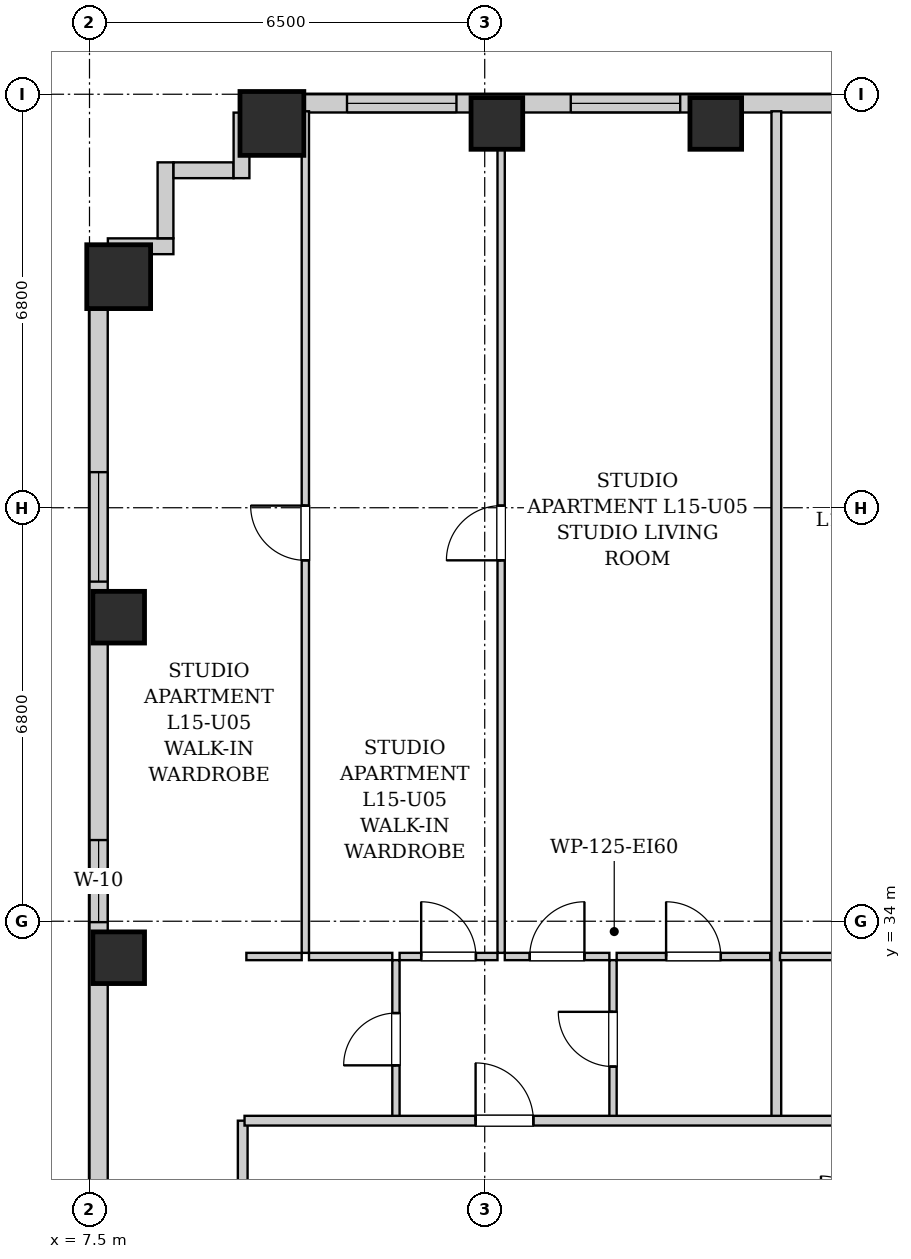
"""IFC4 building model, lengths in metres.
Left out: names, types, materials, properties, quantities, classifications, styles, units other than length and angle.
Written with IfcOpenShell. Run it as: python <this file> out.ifc"""

import sys

from ifc_helpers import new_model, si_unit, direction, frame, frame_2d, origin, origin_2d, place, context, subcontext, project, spatial, rectangle, extrude, element, fill, save


model = new_model("IFC4")
c1 = context("Model", 3, precision=1e-05, world=origin(), true_north=direction((0.0, 1.0)))
c2 = subcontext(c1, "Body", "Model", "MODEL_VIEW")
j1 = project(units=[si_unit("LENGTHUNIT", "METRE"), si_unit("PLANEANGLEUNIT", "RADIAN")], contexts=[c1])
p1 = place(None, origin())
s1 = spatial("IfcSite", under=j1, at=p1, CompositionType="ELEMENT")
p2 = place(p1, origin())
s2 = spatial("IfcBuilding", under=s1, at=p2, CompositionType="ELEMENT")
p3 = place(p2, frame((0.0, 0.0, 57.8)))
s3 = spatial("IfcBuildingStorey", under=s2, at=p3, CompositionType="ELEMENT", Elevation=57.8)
p4 = place(p3, frame((10.5, 47.12, 0.0), z_axis=(0.0, 0.0, 1.0), x_axis=(1.0, 0.0, 0.0)))
e1 = element("IfcColumn", 1, at=p4, inside=s3, PredefinedType="COLUMN", context=c2, shape_type="SweptSolid", body=[
    extrude(rectangle(XDim=1.05, YDim=1.05, at=origin_2d()), origin(), (0.0, 0.0, 1.0), 3.2),
])
for number, where, z_axis, x_axis in (
    (2, (14.2, 47.12, 0.0), (0.0, 0.0, 1.0), (1.0, 0.0, 0.0)),
    (3, (17.8, 47.12, 0.0), (0.0, 0.0, 1.0), (1.0, 0.0, 0.0)),
    (4, (7.98, 33.4, 0.0), (0.0, 0.0, 1.0), (1.0, 0.0, 0.0)),
    (5, (7.98, 39.0, 0.0), (0.0, 0.0, 1.0), (1.0, 0.0, 0.0)),
):
    element("IfcColumn", number, at=place(p3, frame(where, z_axis=z_axis, x_axis=x_axis)), inside=s3, PredefinedType="COLUMN", context=c2, shape_type="SweptSolid", body=[
        extrude(rectangle(XDim=0.85, YDim=0.85, at=origin_2d()), origin(), (0.0, 0.0, 1.0), 3.2),
    ])
p5 = place(p3, frame((7.98, 44.6, 0.0), z_axis=(0.0, 0.0, 1.0), x_axis=(1.0, 0.0, 0.0)))
e6 = element("IfcColumn", 6, at=p5, inside=s3, PredefinedType="COLUMN", context=c2, shape_type="SweptSolid", body=[
    extrude(rectangle(XDim=1.05, YDim=1.05, at=origin_2d()), origin(), (0.0, 0.0, 1.0), 3.2),
])
p6 = place(p3, frame((10.0, 47.45, 0.0), z_axis=(0.0, 0.0, 1.0), x_axis=(1.0, 0.0, 0.0)))
e7 = element("IfcWall", 7, at=p6, inside=s3, PredefinedType="SOLIDWALL", context=c2, shape_type="SweptSolid", body=[
    extrude(rectangle(XDim=27.55, YDim=0.3, at=frame_2d((13.775, 0.0))), origin(), (0.0, 0.0, 1.0), 1.975),
])
p7 = place(p6, frame((1.735, 0.0, 0.55)))
e8 = element("IfcOpeningElement", 8, at=p7, cuts=e7, PredefinedType="OPENING", context=c2, shape_type="SweptSolid", body=[
    extrude(rectangle(XDim=1.8, YDim=1.2, at=frame_2d((0.9, 0.6))), frame((0.0, 0.16, 0.0), z_axis=(0.0, -1.0, 0.0), x_axis=(1.0, 0.0, 0.0)), (0.0, 0.0, 1.0), 0.32),
])
p8 = place(p6, frame((5.415, 0.0, 0.55)))
e9 = element("IfcOpeningElement", 9, at=p8, cuts=e7, PredefinedType="OPENING", context=c2, shape_type="SweptSolid", body=[
    extrude(rectangle(XDim=1.8, YDim=1.2, at=frame_2d((0.9, 0.6))), frame((0.0, 0.16, 0.0), z_axis=(0.0, -1.0, 0.0), x_axis=(1.0, 0.0, 0.0)), (0.0, 0.0, 1.0), 0.32),
])
p9 = place(p6, frame((10.617, 0.0, 0.55)))
e10 = element("IfcOpeningElement", 10, at=p9, cuts=e7, PredefinedType="OPENING", context=c2, shape_type="SweptSolid", body=[
    extrude(rectangle(XDim=1.8, YDim=1.2, at=frame_2d((0.9, 0.6))), frame((0.0, 0.16, 0.0), z_axis=(0.0, -1.0, 0.0), x_axis=(1.0, 0.0, 0.0)), (0.0, 0.0, 1.0), 0.32),
])
p10 = place(p6, frame((17.5, 0.0, 0.55)))
e11 = element("IfcOpeningElement", 11, at=p10, cuts=e7, PredefinedType="OPENING", context=c2, shape_type="SweptSolid", body=[
    extrude(rectangle(XDim=0.85, YDim=1.2, at=frame_2d((0.425, 0.6))), frame((0.0, 0.16, 0.0), z_axis=(0.0, -1.0, 0.0), x_axis=(1.0, 0.0, 0.0)), (0.0, 0.0, 1.0), 0.32),
])
p11 = place(p6, frame((19.349, 0.0, 0.55)))
e12 = element("IfcOpeningElement", 12, at=p11, cuts=e7, PredefinedType="OPENING", context=c2, shape_type="SweptSolid", body=[
    extrude(rectangle(XDim=1.8, YDim=1.2, at=frame_2d((0.9, 0.6))), frame((0.0, 0.16, 0.0), z_axis=(0.0, -1.0, 0.0), x_axis=(1.0, 0.0, 0.0)), (0.0, 0.0, 1.0), 0.32),
])
p12 = place(p6, frame((24.769, 0.0, 0.55)))
e13 = element("IfcOpeningElement", 13, at=p12, cuts=e7, PredefinedType="OPENING", context=c2, shape_type="SweptSolid", body=[
    extrude(rectangle(XDim=1.8, YDim=1.2, at=frame_2d((0.9, 0.6))), frame((0.0, 0.16, 0.0), z_axis=(0.0, -1.0, 0.0), x_axis=(1.0, 0.0, 0.0)), (0.0, 0.0, 1.0), 0.32),
])
p13 = place(p3, frame((7.65, 19.4, 0.0), z_axis=(0.0, 0.0, 1.0), x_axis=(0.0, 1.0, 0.0)))
e14 = element("IfcWall", 14, at=p13, inside=s3, PredefinedType="SOLIDWALL", context=c2, shape_type="SweptSolid", body=[
    extrude(rectangle(XDim=25.7, YDim=0.3, at=frame_2d((12.85, 0.0))), origin(), (0.0, 0.0, 1.0), 1.975),
])
p14 = place(p13, frame((20.185, 0.0, 0.55)))
e15 = element("IfcOpeningElement", 15, at=p14, cuts=e14, PredefinedType="OPENING", context=c2, shape_type="SweptSolid", body=[
    extrude(rectangle(XDim=1.8, YDim=1.2, at=frame_2d((0.9, 0.6))), frame((0.0, 0.16, 0.0), z_axis=(0.0, -1.0, 0.0), x_axis=(1.0, 0.0, 0.0)), (0.0, 0.0, 1.0), 0.32),
])
p15 = place(p13, frame((14.585, 0.0, 0.55)))
e16 = element("IfcOpeningElement", 16, at=p15, cuts=e14, PredefinedType="OPENING", context=c2, shape_type="SweptSolid", body=[
    extrude(rectangle(XDim=1.35, YDim=1.2, at=frame_2d((0.675, 0.6))), frame((0.0, 0.16, 0.0), z_axis=(0.0, -1.0, 0.0), x_axis=(1.0, 0.0, 0.0)), (0.0, 0.0, 1.0), 0.32),
])
p16 = place(p13, frame((5.1, 0.0, 0.55)))
e17 = element("IfcOpeningElement", 17, at=p16, cuts=e14, PredefinedType="OPENING", context=c2, shape_type="SweptSolid", body=[
    extrude(rectangle(XDim=1.8, YDim=1.2, at=frame_2d((0.9, 0.6))), frame((0.0, 0.16, 0.0), z_axis=(0.0, -1.0, 0.0), x_axis=(1.0, 0.0, 0.0)), (0.0, 0.0, 1.0), 0.32),
])
p17 = place(p13, frame((7.16, 0.0, 0.55)))
e18 = element("IfcOpeningElement", 18, at=p17, cuts=e14, PredefinedType="OPENING", context=c2, shape_type="SweptSolid", body=[
    extrude(rectangle(XDim=1.35, YDim=1.2, at=frame_2d((0.675, 0.6))), frame((0.0, 0.16, 0.0), z_axis=(0.0, -1.0, 0.0), x_axis=(1.0, 0.0, 0.0)), (0.0, 0.0, 1.0), 0.32),
])
p18 = place(p3, frame((7.802, 45.1, 0.0), z_axis=(0.0, 0.0, 1.0), x_axis=(1.0, 0.0, 0.0)))
e19 = element("IfcWall", 19, at=p18, inside=s3, PredefinedType="SOLIDWALL", context=c2, shape_type="SweptSolid", body=[
    extrude(rectangle(XDim=1.078, YDim=0.26, at=frame_2d((0.539, 0.0))), origin(), (0.0, 0.0, 1.0), 2.94),
])
p19 = place(p3, frame((8.75, 45.232, 0.0), z_axis=(0.0, 0.0, 1.0), x_axis=(0.0, 1.0, 0.0)))
e20 = element("IfcWall", 20, at=p19, inside=s3, PredefinedType="SOLIDWALL", context=c2, shape_type="SweptSolid", body=[
    extrude(rectangle(XDim=1.248, YDim=0.26, at=frame_2d((0.624, 0.0))), origin(), (0.0, 0.0, 1.0), 2.94),
])
p20 = place(p3, frame((8.882, 46.35, 0.0), z_axis=(0.0, 0.0, 1.0), x_axis=(1.0, 0.0, 0.0)))
e21 = element("IfcWall", 21, at=p20, inside=s3, PredefinedType="SOLIDWALL", context=c2, shape_type="SweptSolid", body=[
    extrude(rectangle(XDim=0.986, YDim=0.26, at=frame_2d((0.493, 0.0))), origin(), (0.0, 0.0, 1.0), 2.94),
])
p21 = place(p3, frame((10.0, 46.22, 0.0), z_axis=(0.0, 0.0, 1.0), x_axis=(0.0, 1.0, 0.0)))
e22 = element("IfcWall", 22, at=p21, inside=s3, PredefinedType="SOLIDWALL", context=c2, shape_type="SweptSolid", body=[
    extrude(rectangle(XDim=1.078, YDim=0.26, at=frame_2d((0.539, 0.0))), origin(), (0.0, 0.0, 1.0), 2.94),
])
p22 = place(p3, frame((10.02, 28.98, 0.0), z_axis=(0.0, 0.0, 1.0), x_axis=(0.0, 1.0, 0.0)))
e23 = element("IfcWall", 23, at=p22, inside=s3, PredefinedType="PARTITIONING", context=c2, shape_type="SweptSolid", body=[
    extrude(rectangle(XDim=1.74, YDim=0.16, at=frame_2d((0.87, 0.0))), origin(), (0.0, 0.0, 1.0), 2.94),
])
p23 = place(p3, frame((12.54, 30.76, 0.0), z_axis=(0.0, 0.0, 1.0), x_axis=(0.0, 1.0, 0.0)))
e24 = element("IfcWall", 24, at=p23, inside=s3, PredefinedType="PARTITIONING", context=c2, shape_type="SweptSolid", body=[
    extrude(rectangle(XDim=2.6, YDim=0.12, at=frame_2d((1.3, 0.0))), origin(), (0.0, 0.0, 1.0), 2.94),
])
p24 = place(p23, frame((0.87, 0.0, 0.0)))
e25 = element("IfcOpeningElement", 25, at=p24, cuts=e24, PredefinedType="OPENING", context=c2, shape_type="SweptSolid", body=[
    extrude(rectangle(XDim=0.86, YDim=2.05, at=frame_2d((0.43, 1.025))), frame((0.0, 0.07, 0.0), z_axis=(0.0, -1.0, 0.0), x_axis=(1.0, 0.0, 0.0)), (0.0, 0.0, 1.0), 0.14),
])
p25 = place(p3, frame((10.08, 33.42, 0.0), z_axis=(0.0, 0.0, 1.0), x_axis=(1.0, 0.0, 0.0)))
e26 = element("IfcWall", 26, at=p25, inside=s3, PredefinedType="PARTITIONING", context=c2, shape_type="SweptSolid", body=[
    extrude(rectangle(XDim=0.91, YDim=0.12, at=frame_2d((0.455, 0.0))), origin(), (0.0, 0.0, 1.0), 2.94),
])
p26 = place(p3, frame((11.11, 33.42, 0.0), z_axis=(0.0, 0.0, 1.0), x_axis=(1.0, 0.0, 0.0)))
e27 = element("IfcWall", 27, at=p26, inside=s3, PredefinedType="PARTITIONING", context=c2, shape_type="SweptSolid", body=[
    extrude(rectangle(XDim=1.37, YDim=0.12, at=frame_2d((0.685, 0.0))), origin(), (0.0, 0.0, 1.0), 2.94),
])
p27 = place(p3, frame((16.11, 30.76, 0.0), z_axis=(0.0, 0.0, 1.0), x_axis=(0.0, 1.0, 0.0)))
e28 = element("IfcWall", 28, at=p27, inside=s3, PredefinedType="PARTITIONING", context=c2, shape_type="SweptSolid", body=[
    extrude(rectangle(XDim=2.6, YDim=0.12, at=frame_2d((1.3, 0.0))), origin(), (0.0, 0.0, 1.0), 2.94),
])
p28 = place(p27, frame((0.85, 0.0, 0.0)))
e29 = element("IfcOpeningElement", 29, at=p28, cuts=e28, PredefinedType="OPENING", context=c2, shape_type="SweptSolid", body=[
    extrude(rectangle(XDim=0.9, YDim=2.05, at=frame_2d((0.45, 1.025))), frame((0.0, 0.07, 0.0), z_axis=(0.0, -1.0, 0.0), x_axis=(1.0, 0.0, 0.0)), (0.0, 0.0, 1.0), 0.14),
])
p29 = place(p3, frame((12.6, 33.42, 0.0), z_axis=(0.0, 0.0, 1.0), x_axis=(1.0, 0.0, 0.0)))
e30 = element("IfcWall", 30, at=p29, inside=s3, PredefinedType="PARTITIONING", context=c2, shape_type="SweptSolid", body=[
    extrude(rectangle(XDim=1.61, YDim=0.12, at=frame_2d((0.805, 0.0))), origin(), (0.0, 0.0, 1.0), 2.94),
])
p30 = place(p29, frame((0.355, 0.0, 0.0)))
e31 = element("IfcOpeningElement", 31, at=p30, cuts=e30, PredefinedType="OPENING", context=c2, shape_type="SweptSolid", body=[
    extrude(rectangle(XDim=0.9, YDim=2.05, at=frame_2d((0.45, 1.025))), frame((0.0, 0.07, 0.0), z_axis=(0.0, -1.0, 0.0), x_axis=(1.0, 0.0, 0.0)), (0.0, 0.0, 1.0), 0.14),
])
p31 = place(p3, frame((14.33, 33.42, 0.0), z_axis=(0.0, 0.0, 1.0), x_axis=(1.0, 0.0, 0.0)))
e32 = element("IfcWall", 32, at=p31, inside=s3, PredefinedType="PARTITIONING", context=c2, shape_type="SweptSolid", body=[
    extrude(rectangle(XDim=1.72, YDim=0.12, at=frame_2d((0.86, 0.0))), origin(), (0.0, 0.0, 1.0), 2.94),
])
p32 = place(p31, frame((0.41, 0.0, 0.0)))
e33 = element("IfcOpeningElement", 33, at=p32, cuts=e32, PredefinedType="OPENING", context=c2, shape_type="SweptSolid", body=[
    extrude(rectangle(XDim=0.9, YDim=2.05, at=frame_2d((0.45, 1.025))), frame((0.0, 0.07, 0.0), z_axis=(0.0, -1.0, 0.0), x_axis=(1.0, 0.0, 0.0)), (0.0, 0.0, 1.0), 0.14),
])
p33 = place(p3, frame((16.17, 33.42, 0.0), z_axis=(0.0, 0.0, 1.0), x_axis=(1.0, 0.0, 0.0)))
e34 = element("IfcWall", 34, at=p33, inside=s3, PredefinedType="PARTITIONING", context=c2, shape_type="SweptSolid", body=[
    extrude(rectangle(XDim=2.526, YDim=0.12, at=frame_2d((1.263, 0.0))), origin(), (0.0, 0.0, 1.0), 2.94),
])
p34 = place(p33, frame((0.813, 0.0, 0.0)))
e35 = element("IfcOpeningElement", 35, at=p34, cuts=e34, PredefinedType="OPENING", context=c2, shape_type="SweptSolid", body=[
    extrude(rectangle(XDim=0.9, YDim=2.05, at=frame_2d((0.45, 1.025))), frame((0.0, 0.07, 0.0), z_axis=(0.0, -1.0, 0.0), x_axis=(1.0, 0.0, 0.0)), (0.0, 0.0, 1.0), 0.14),
])
p35 = place(p3, frame((11.05, 33.48, 0.0), z_axis=(0.0, 0.0, 1.0), x_axis=(0.0, 1.0, 0.0)))
e36 = element("IfcWall", 36, at=p35, inside=s3, PredefinedType="PARTITIONING", context=c2, shape_type="SweptSolid", body=[
    extrude(rectangle(XDim=13.84, YDim=0.12, at=frame_2d((6.92, 0.0))), origin(), (0.0, 0.0, 1.0), 2.94),
])
p36 = place(p35, frame((6.455, 0.0, 0.0)))
e37 = element("IfcOpeningElement", 37, at=p36, cuts=e36, PredefinedType="OPENING", context=c2, shape_type="SweptSolid", body=[
    extrude(rectangle(XDim=0.9, YDim=2.05, at=frame_2d((0.45, 1.025))), frame((0.0, 0.07, 0.0), z_axis=(0.0, -1.0, 0.0), x_axis=(1.0, 0.0, 0.0)), (0.0, 0.0, 1.0), 0.14),
])
p37 = place(p3, frame((14.27, 33.48, 0.0), z_axis=(0.0, 0.0, 1.0), x_axis=(0.0, 1.0, 0.0)))
e38 = element("IfcWall", 38, at=p37, inside=s3, PredefinedType="PARTITIONING", context=c2, shape_type="SweptSolid", body=[
    extrude(rectangle(XDim=13.84, YDim=0.12, at=frame_2d((6.92, 0.0))), origin(), (0.0, 0.0, 1.0), 2.94),
])
p38 = place(p37, frame((6.455, 0.0, 0.0)))
e39 = element("IfcOpeningElement", 39, at=p38, cuts=e38, PredefinedType="OPENING", context=c2, shape_type="SweptSolid", body=[
    extrude(rectangle(XDim=0.9, YDim=2.05, at=frame_2d((0.45, 1.025))), frame((0.0, 0.07, 0.0), z_axis=(0.0, -1.0, 0.0), x_axis=(1.0, 0.0, 0.0)), (0.0, 0.0, 1.0), 0.14),
])
p39 = place(p3, frame((18.796, 30.76, 0.0), z_axis=(0.0, 0.0, 1.0), x_axis=(0.0, 1.0, 0.0)))
e40 = element("IfcWall", 40, at=p39, inside=s3, PredefinedType="PARTITIONING", context=c2, shape_type="SweptSolid", body=[
    extrude(rectangle(XDim=16.56, YDim=0.16, at=frame_2d((8.28, 0.0))), origin(), (0.0, 0.0, 1.0), 2.94),
])
p40 = place(p3, frame((18.856, 33.42, 0.0), z_axis=(0.0, 0.0, 1.0), x_axis=(1.0, 0.0, 0.0)))
e41 = element("IfcWall", 41, at=p40, inside=s3, PredefinedType="PARTITIONING", context=c2, shape_type="SweptSolid", body=[
    extrude(rectangle(XDim=1.85, YDim=0.12, at=frame_2d((0.925, 0.0))), origin(), (0.0, 0.0, 1.0), 2.94),
])
p41 = place(p3, frame((10.05, 30.72, 0.0), z_axis=(0.0, 0.0, 1.0), x_axis=(1.0, 0.0, 0.0)))
e42 = element("IfcWall", 42, at=p41, inside=s3, PredefinedType="PARTITIONING", context=c2, shape_type="SweptSolid", body=[
    extrude(rectangle(XDim=33.9, YDim=0.16, at=frame_2d((16.95, 0.0))), origin(), (0.0, 0.0, 1.0), 2.94),
])
p42 = place(p41, frame((3.8, 0.0, 0.0)))
e43 = element("IfcOpeningElement", 43, at=p42, cuts=e42, PredefinedType="OPENING", context=c2, shape_type="SweptSolid", body=[
    extrude(rectangle(XDim=0.95, YDim=2.1, at=frame_2d((0.475, 1.05))), frame((0.0, 0.09, 0.0), z_axis=(0.0, -1.0, 0.0), x_axis=(1.0, 0.0, 0.0)), (0.0, 0.0, 1.0), 0.18),
])
p43 = place(p41, frame((11.977, 0.0, 0.0)))
e44 = element("IfcOpeningElement", 44, at=p43, cuts=e42, PredefinedType="OPENING", context=c2, shape_type="SweptSolid", body=[
    extrude(rectangle(XDim=0.95, YDim=2.1, at=frame_2d((0.475, 1.05))), frame((0.0, 0.09, 0.0), z_axis=(0.0, -1.0, 0.0), x_axis=(1.0, 0.0, 0.0)), (0.0, 0.0, 1.0), 0.18),
])
p44 = place(p41, frame((18.09, 0.0, 0.0)))
e45 = element("IfcOpeningElement", 45, at=p44, cuts=e42, PredefinedType="OPENING", context=c2, shape_type="SweptSolid", body=[
    extrude(rectangle(XDim=0.95, YDim=2.1, at=frame_2d((0.475, 1.05))), frame((0.0, 0.09, 0.0), z_axis=(0.0, -1.0, 0.0), x_axis=(1.0, 0.0, 0.0)), (0.0, 0.0, 1.0), 0.18),
])
p45 = place(p41, frame((30.956, 0.0, 0.0)))
e46 = element("IfcOpeningElement", 46, at=p45, cuts=e42, PredefinedType="OPENING", context=c2, shape_type="SweptSolid", body=[
    extrude(rectangle(XDim=0.95, YDim=2.1, at=frame_2d((0.475, 1.05))), frame((0.0, 0.09, 0.0), z_axis=(0.0, -1.0, 0.0), x_axis=(1.0, 0.0, 0.0)), (0.0, 0.0, 1.0), 0.18),
])
p46 = place(p24, origin())
e47 = element("IfcDoor", 47, at=p46, inside=s3, OperationType="SINGLE_SWING_LEFT", PredefinedType="DOOR", context=c2, shape_type="SweptSolid", body=[
    extrude(rectangle(XDim=0.86, YDim=2.05, at=frame_2d((0.43, 1.025))), frame((0.0, 0.025, 0.0), z_axis=(0.0, -1.0, 0.0), x_axis=(1.0, 0.0, 0.0)), (0.0, 0.0, 1.0), 0.05),
])
fill(e25, e47)
p47 = place(p28, origin())
e48 = element("IfcDoor", 48, at=p47, inside=s3, OperationType="SINGLE_SWING_RIGHT", PredefinedType="DOOR", context=c2, shape_type="SweptSolid", body=[
    extrude(rectangle(XDim=0.9, YDim=2.05, at=frame_2d((0.45, 1.025))), frame((0.0, 0.025, 0.0), z_axis=(0.0, -1.0, 0.0), x_axis=(1.0, 0.0, 0.0)), (0.0, 0.0, 1.0), 0.05),
])
fill(e29, e48)
p48 = place(p30, origin())
e49 = element("IfcDoor", 49, at=p48, inside=s3, OperationType="SINGLE_SWING_LEFT", PredefinedType="DOOR", context=c2, shape_type="SweptSolid", body=[
    extrude(rectangle(XDim=0.9, YDim=2.05, at=frame_2d((0.45, 1.025))), frame((0.0, 0.025, 0.0), z_axis=(0.0, -1.0, 0.0), x_axis=(1.0, 0.0, 0.0)), (0.0, 0.0, 1.0), 0.05),
])
fill(e31, e49)
p49 = place(p32, origin())
e50 = element("IfcDoor", 50, at=p49, inside=s3, OperationType="SINGLE_SWING_RIGHT", PredefinedType="DOOR", context=c2, shape_type="SweptSolid", body=[
    extrude(rectangle(XDim=0.9, YDim=2.05, at=frame_2d((0.45, 1.025))), frame((0.0, 0.025, 0.0), z_axis=(0.0, -1.0, 0.0), x_axis=(1.0, 0.0, 0.0)), (0.0, 0.0, 1.0), 0.05),
])
fill(e33, e50)
p50 = place(p34, origin())
e51 = element("IfcDoor", 51, at=p50, inside=s3, OperationType="SINGLE_SWING_LEFT", PredefinedType="DOOR", context=c2, shape_type="SweptSolid", body=[
    extrude(rectangle(XDim=0.9, YDim=2.05, at=frame_2d((0.45, 1.025))), frame((0.0, 0.025, 0.0), z_axis=(0.0, -1.0, 0.0), x_axis=(1.0, 0.0, 0.0)), (0.0, 0.0, 1.0), 0.05),
])
fill(e35, e51)
p51 = place(p36, origin())
e52 = element("IfcDoor", 52, at=p51, inside=s3, OperationType="SINGLE_SWING_RIGHT", PredefinedType="DOOR", context=c2, shape_type="SweptSolid", body=[
    extrude(rectangle(XDim=0.9, YDim=2.05, at=frame_2d((0.45, 1.025))), frame((0.0, 0.025, 0.0), z_axis=(0.0, -1.0, 0.0), x_axis=(1.0, 0.0, 0.0)), (0.0, 0.0, 1.0), 0.05),
])
fill(e37, e52)
p52 = place(p38, origin())
e53 = element("IfcDoor", 53, at=p52, inside=s3, OperationType="SINGLE_SWING_LEFT", PredefinedType="DOOR", context=c2, shape_type="SweptSolid", body=[
    extrude(rectangle(XDim=0.9, YDim=2.05, at=frame_2d((0.45, 1.025))), frame((0.0, 0.025, 0.0), z_axis=(0.0, -1.0, 0.0), x_axis=(1.0, 0.0, 0.0)), (0.0, 0.0, 1.0), 0.05),
])
fill(e39, e53)
p53 = place(p42, origin())
e54 = element("IfcDoor", 54, at=p53, inside=s3, OperationType="SINGLE_SWING_LEFT", PredefinedType="DOOR", context=c2, shape_type="SweptSolid", body=[
    extrude(rectangle(XDim=0.95, YDim=2.1, at=frame_2d((0.475, 1.05))), frame((0.0, 0.025, 0.0), z_axis=(0.0, -1.0, 0.0), x_axis=(1.0, 0.0, 0.0)), (0.0, 0.0, 1.0), 0.05),
])
fill(e43, e54)
p54 = place(p14, origin())
e55 = element("IfcWindow", 55, at=p54, inside=s3, PartitioningType="DOUBLE_PANEL_VERTICAL", PredefinedType="WINDOW", context=c2, shape_type="SweptSolid", body=[
    extrude(rectangle(XDim=1.8, YDim=1.2, at=frame_2d((0.9, 0.6))), frame((0.0, 0.03, 0.0), z_axis=(0.0, -1.0, 0.0), x_axis=(1.0, 0.0, 0.0)), (0.0, 0.0, 1.0), 0.06),
])
fill(e15, e55)
p55 = place(p15, origin())
e56 = element("IfcWindow", 56, at=p55, inside=s3, PartitioningType="SINGLE_PANEL", PredefinedType="WINDOW", context=c2, shape_type="SweptSolid", body=[
    extrude(rectangle(XDim=1.35, YDim=1.2, at=frame_2d((0.675, 0.6))), frame((0.0, 0.03, 0.0), z_axis=(0.0, -1.0, 0.0), x_axis=(1.0, 0.0, 0.0)), (0.0, 0.0, 1.0), 0.06),
])
fill(e16, e56)
p56 = place(p7, origin())
e57 = element("IfcWindow", 57, at=p56, inside=s3, PartitioningType="DOUBLE_PANEL_VERTICAL", PredefinedType="WINDOW", context=c2, shape_type="SweptSolid", body=[
    extrude(rectangle(XDim=1.8, YDim=1.2, at=frame_2d((0.9, 0.6))), frame((0.0, 0.03, 0.0), z_axis=(0.0, -1.0, 0.0), x_axis=(1.0, 0.0, 0.0)), (0.0, 0.0, 1.0), 0.06),
])
fill(e8, e57)
p57 = place(p8, origin())
e58 = element("IfcWindow", 58, at=p57, inside=s3, PartitioningType="DOUBLE_PANEL_VERTICAL", PredefinedType="WINDOW", context=c2, shape_type="SweptSolid", body=[
    extrude(rectangle(XDim=1.8, YDim=1.2, at=frame_2d((0.9, 0.6))), frame((0.0, 0.03, 0.0), z_axis=(0.0, -1.0, 0.0), x_axis=(1.0, 0.0, 0.0)), (0.0, 0.0, 1.0), 0.06),
])
fill(e9, e58)
save(model, sys.argv[1])
